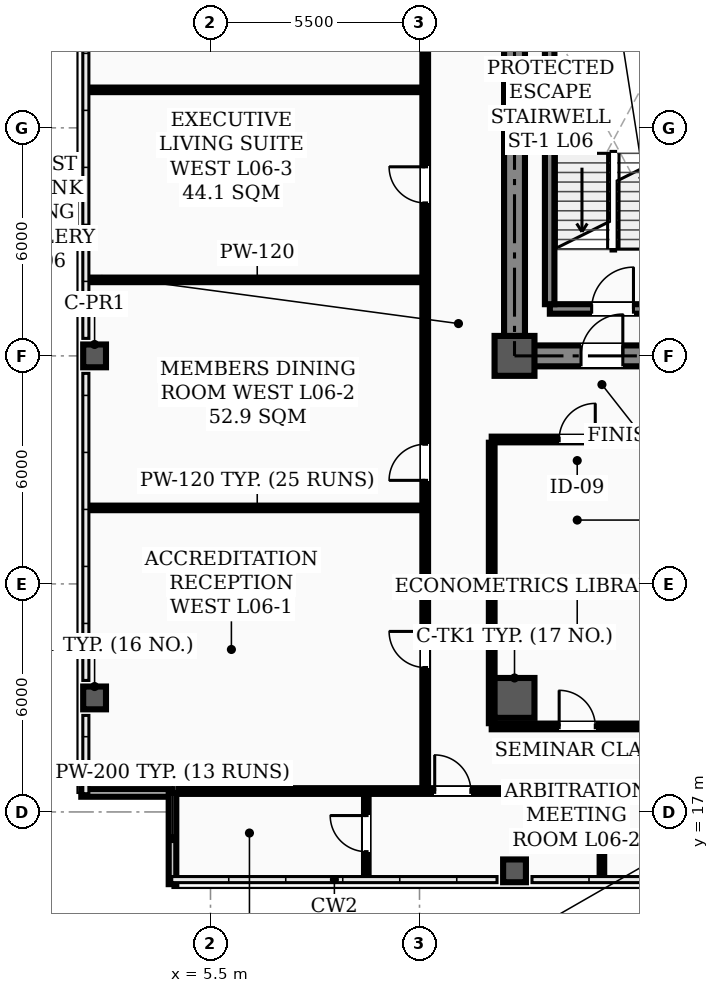
"""IFC4 building model, lengths in metres.
Left out: names, types, materials, properties, quantities, classifications, styles, units other than length and angle.
Written with IfcOpenShell. Run it as: python <this file> out.ifc"""

import sys

from ifc_helpers import new_model, si_unit, direction, frame, frame_2d, origin, origin_2d, place, context, subcontext, project, spatial, rectangle, hollow_rectangle, extrude, element, fill, save


model = new_model("IFC4")
c1 = context("Model", 3, precision=1e-05, world=origin(), true_north=direction((0.0, 1.0)))
c2 = subcontext(c1, "Body", "Model", "MODEL_VIEW")
j1 = project(units=[si_unit("LENGTHUNIT", "METRE"), si_unit("PLANEANGLEUNIT", "RADIAN")], contexts=[c1])
p1 = place(None, origin())
s1 = spatial("IfcSite", under=j1, at=p1, CompositionType="ELEMENT")
p2 = place(p1, origin())
s2 = spatial("IfcBuilding", under=s1, at=p2, CompositionType="ELEMENT")
p3 = place(p2, frame((0.0, 0.0, 26.5)))
s3 = spatial("IfcBuildingStorey", under=s2, at=p3, CompositionType="ELEMENT", Elevation=26.5)
for number, where, z_axis, x_axis in (
    (1, (13.5, 29.0, 0.0), (0.0, 0.0, 1.0), (1.0, 0.0, 0.0)),
    (2, (13.5, 20.0, 0.0), (0.0, 0.0, 1.0), (1.0, 0.0, 0.0)),
):
    element("IfcColumn", number, at=place(p3, frame(where, z_axis=z_axis, x_axis=x_axis)), inside=s3, PredefinedType="COLUMN", context=c2, shape_type="SweptSolid", body=[
        extrude(hollow_rectangle(XDim=1.05, YDim=1.05, WallThickness=0.038, InnerFilletRadius=0.019, OuterFilletRadius=0.057, at=origin_2d()), origin(), (0.0, 0.0, 1.0), 3.9),
    ])
for number, where, z_axis, x_axis in (
    (3, (2.45, 20.0, 0.0), (0.0, 0.0, 1.0), (1.0, 0.0, 0.0)),
    (4, (2.45, 29.0, 0.0), (0.0, 0.0, 1.0), (1.0, 0.0, 0.0)),
    (5, (13.5, 15.45, 0.0), (0.0, 0.0, 1.0), (1.0, 0.0, 0.0)),
):
    element("IfcColumn", number, at=place(p3, frame(where, z_axis=z_axis, x_axis=x_axis)), inside=s3, PredefinedType="COLUMN", context=c2, shape_type="SweptSolid", body=[
        extrude(hollow_rectangle(XDim=0.6, YDim=0.6, WallThickness=0.026, InnerFilletRadius=0.013, OuterFilletRadius=0.039, at=origin_2d()), origin(), (0.0, 0.0, 1.0), 3.9),
    ])
for number, where, z_axis, x_axis in (
    (6, (2.1, 17.5, 0.0), (0.0, 0.0, 1.0), (1.0, 0.0, 0.0)),
    (7, (4.5, 17.5, 0.0), (0.0, 0.0, 1.0), (0.0, -1.0, 0.0)),
):
    element("IfcWall", number, at=place(p3, frame(where, z_axis=z_axis, x_axis=x_axis)), inside=s3, PredefinedType="PARAPET", context=c2, shape_type="SweptSolid", body=[
        extrude(rectangle(XDim=2.4, YDim=0.2, at=frame_2d((1.2, 0.0))), origin(), (0.0, 0.0, 1.0), 1.2),
    ])
p4 = place(p3, frame((13.5, 29.0, 0.0), z_axis=(0.0, 0.0, 1.0), x_axis=(1.0, 0.0, 0.0)))
e8 = element("IfcWall", 8, at=p4, inside=s3, PredefinedType="SHEAR", context=c2, shape_type="SweptSolid", body=[
    extrude(rectangle(XDim=30.5, YDim=0.55, at=frame_2d((15.25, 0.0))), origin(), (0.0, 0.0, 1.0), 3.72),
])
p5 = place(p4, frame((1.75, 0.0, 0.0)))
e9 = element("IfcOpeningElement", 9, at=p5, cuts=e8, PredefinedType="OPENING", context=c2, shape_type="SweptSolid", body=[
    extrude(rectangle(XDim=1.1, YDim=2.08, at=frame_2d((0.55, 1.04))), frame((0.0, 0.285, 0.0), z_axis=(0.0, -1.0, 0.0), x_axis=(1.0, 0.0, 0.0)), (0.0, 0.0, 1.0), 0.57),
])
p6 = place(p4, frame((26.7, 0.0, 0.0)))
e10 = element("IfcOpeningElement", 10, at=p6, cuts=e8, PredefinedType="OPENING", context=c2, shape_type="SweptSolid", body=[
    extrude(rectangle(XDim=1.1, YDim=2.08, at=frame_2d((0.55, 1.04))), frame((0.0, 0.285, 0.0), z_axis=(0.0, -1.0, 0.0), x_axis=(1.0, 0.0, 0.0)), (0.0, 0.0, 1.0), 0.57),
])
p7 = place(p4, frame((6.8, 0.0, 0.0)))
e11 = element("IfcOpeningElement", 11, at=p7, cuts=e8, PredefinedType="OPENING", context=c2, shape_type="SweptSolid", body=[
    extrude(rectangle(XDim=1.1, YDim=2.08, at=frame_2d((0.55, 1.04))), frame((0.0, 0.285, 0.0), z_axis=(0.0, -1.0, 0.0), x_axis=(1.0, 0.0, 0.0)), (0.0, 0.0, 1.0), 0.57),
])
p8 = place(p4, frame((13.2, 0.0, 0.0)))
e12 = element("IfcOpeningElement", 12, at=p8, cuts=e8, PredefinedType="OPENING", context=c2, shape_type="SweptSolid", body=[
    extrude(rectangle(XDim=1.6, YDim=2.08, at=frame_2d((0.8, 1.04))), frame((0.0, 0.285, 0.0), z_axis=(0.0, -1.0, 0.0), x_axis=(1.0, 0.0, 0.0)), (0.0, 0.0, 1.0), 0.57),
])
p9 = place(p4, frame((20.525, 0.0, 0.0)))
e13 = element("IfcOpeningElement", 13, at=p9, cuts=e8, PredefinedType="OPENING", context=c2, shape_type="SweptSolid", body=[
    extrude(rectangle(XDim=0.95, YDim=2.08, at=frame_2d((0.475, 1.04))), frame((0.0, 0.285, 0.0), z_axis=(0.0, -1.0, 0.0), x_axis=(1.0, 0.0, 0.0)), (0.0, 0.0, 1.0), 0.57),
])
p10 = place(p3, frame((13.5, 29.35, 0.0), z_axis=(0.0, 0.0, 1.0), x_axis=(0.0, 1.0, 0.0)))
e14 = element("IfcWall", 14, at=p10, inside=s3, PredefinedType="SHEAR", context=c2, shape_type="SweptSolid", body=[
    extrude(rectangle(XDim=8.6, YDim=0.55, at=frame_2d((4.3, 0.0))), origin(), (0.0, 0.0, 1.0), 3.72),
])
p11 = place(p3, frame((14.43, 30.235, 0.0), z_axis=(0.0, 0.0, 1.0), x_axis=(1.0, 0.0, 0.0)))
e15 = element("IfcWall", 15, at=p11, inside=s3, PredefinedType="STANDARD", context=c2, shape_type="SweptSolid", body=[
    extrude(rectangle(XDim=3.34, YDim=0.25, at=frame_2d((1.67, 0.0))), origin(), (0.0, 0.0, 1.0), 3.72),
])
p12 = place(p11, frame((1.1, 0.0, 0.0)))
e16 = element("IfcOpeningElement", 16, at=p12, cuts=e15, PredefinedType="OPENING", context=c2, shape_type="SweptSolid", body=[
    extrude(rectangle(XDim=1.1, YDim=2.08, at=frame_2d((0.55, 1.04))), frame((0.0, 0.135, 0.0), z_axis=(0.0, -1.0, 0.0), x_axis=(1.0, 0.0, 0.0)), (0.0, 0.0, 1.0), 0.27),
])
p13 = place(p3, frame((14.425, 30.36, 0.0), z_axis=(0.0, 0.0, 1.0), x_axis=(0.0, 1.0, 0.0)))
e17 = element("IfcWall", 17, at=p13, inside=s3, PredefinedType="STANDARD", context=c2, shape_type="SweptSolid", body=[
    extrude(rectangle(XDim=7.184, YDim=0.25, at=frame_2d((3.592, 0.0))), origin(), (0.0, 0.0, 1.0), 3.72),
])
p14 = place(p3, frame((12.9, 26.8, 0.0), z_axis=(0.0, 0.0, 1.0), x_axis=(1.0, 0.0, 0.0)))
e18 = element("IfcWall", 18, at=p14, inside=s3, PredefinedType="PARTITIONING", context=c2, shape_type="SweptSolid", body=[
    extrude(rectangle(XDim=31.7, YDim=0.15, at=frame_2d((15.85, 0.0))), origin(), (0.0, 0.0, 1.0), 3.1),
])
p15 = place(p14, frame((13.6, 0.0, 0.0)))
e19 = element("IfcOpeningElement", 19, at=p15, cuts=e18, PredefinedType="OPENING", context=c2, shape_type="SweptSolid", body=[
    extrude(rectangle(XDim=1.6, YDim=2.08, at=frame_2d((0.8, 1.04))), frame((0.0, 0.085, 0.0), z_axis=(0.0, -1.0, 0.0), x_axis=(1.0, 0.0, 0.0)), (0.0, 0.0, 1.0), 0.17),
])
p16 = place(p14, frame((1.775, 0.0, 0.0)))
e20 = element("IfcOpeningElement", 20, at=p16, cuts=e18, PredefinedType="OPENING", context=c2, shape_type="SweptSolid", body=[
    extrude(rectangle(XDim=0.95, YDim=2.08, at=frame_2d((0.475, 1.04))), frame((0.0, 0.085, 0.0), z_axis=(0.0, -1.0, 0.0), x_axis=(1.0, 0.0, 0.0)), (0.0, 0.0, 1.0), 0.17),
])
p17 = place(p14, frame((6.225, 0.0, 0.0)))
e21 = element("IfcOpeningElement", 21, at=p17, cuts=e18, PredefinedType="OPENING", context=c2, shape_type="SweptSolid", body=[
    extrude(rectangle(XDim=0.95, YDim=2.08, at=frame_2d((0.475, 1.04))), frame((0.0, 0.085, 0.0), z_axis=(0.0, -1.0, 0.0), x_axis=(1.0, 0.0, 0.0)), (0.0, 0.0, 1.0), 0.17),
])
p18 = place(p14, frame((10.625, 0.0, 0.0)))
e22 = element("IfcOpeningElement", 22, at=p18, cuts=e18, PredefinedType="OPENING", context=c2, shape_type="SweptSolid", body=[
    extrude(rectangle(XDim=0.95, YDim=2.08, at=frame_2d((0.475, 1.04))), frame((0.0, 0.085, 0.0), z_axis=(0.0, -1.0, 0.0), x_axis=(1.0, 0.0, 0.0)), (0.0, 0.0, 1.0), 0.17),
])
p19 = place(p14, frame((16.075, 0.0, 0.0)))
e23 = element("IfcOpeningElement", 23, at=p19, cuts=e18, PredefinedType="OPENING", context=c2, shape_type="SweptSolid", body=[
    extrude(rectangle(XDim=0.95, YDim=2.08, at=frame_2d((0.475, 1.04))), frame((0.0, 0.085, 0.0), z_axis=(0.0, -1.0, 0.0), x_axis=(1.0, 0.0, 0.0)), (0.0, 0.0, 1.0), 0.17),
])
p20 = place(p14, frame((21.925, 0.0, 0.0)))
e24 = element("IfcOpeningElement", 24, at=p20, cuts=e18, PredefinedType="OPENING", context=c2, shape_type="SweptSolid", body=[
    extrude(rectangle(XDim=0.95, YDim=2.08, at=frame_2d((0.475, 1.04))), frame((0.0, 0.085, 0.0), z_axis=(0.0, -1.0, 0.0), x_axis=(1.0, 0.0, 0.0)), (0.0, 0.0, 1.0), 0.17),
])
p21 = place(p14, frame((28.625, 0.0, 0.0)))
e25 = element("IfcOpeningElement", 25, at=p21, cuts=e18, PredefinedType="OPENING", context=c2, shape_type="SweptSolid", body=[
    extrude(rectangle(XDim=0.95, YDim=2.08, at=frame_2d((0.475, 1.04))), frame((0.0, 0.085, 0.0), z_axis=(0.0, -1.0, 0.0), x_axis=(1.0, 0.0, 0.0)), (0.0, 0.0, 1.0), 0.17),
])
p22 = place(p3, frame((4.66, 17.55, 0.0), z_axis=(0.0, 0.0, 1.0), x_axis=(1.0, 0.0, 0.0)))
e26 = element("IfcWall", 26, at=p22, inside=s3, PredefinedType="PARTITIONING", context=c2, shape_type="SweptSolid", body=[
    extrude(rectangle(XDim=44.68, YDim=0.15, at=frame_2d((22.34, 0.0))), origin(), (0.0, 0.0, 1.0), 3.1),
])
p23 = place(p22, frame((6.74, 0.0, 0.0)))
e27 = element("IfcOpeningElement", 27, at=p23, cuts=e26, PredefinedType="OPENING", context=c2, shape_type="SweptSolid", body=[
    extrude(rectangle(XDim=0.95, YDim=2.08, at=frame_2d((0.475, 1.04))), frame((0.0, 0.085, 0.0), z_axis=(0.0, -1.0, 0.0), x_axis=(1.0, 0.0, 0.0)), (0.0, 0.0, 1.0), 0.17),
])
p24 = place(p22, frame((13.865, 0.0, 0.0)))
e28 = element("IfcOpeningElement", 28, at=p24, cuts=e26, PredefinedType="OPENING", context=c2, shape_type="SweptSolid", body=[
    extrude(rectangle(XDim=0.95, YDim=2.08, at=frame_2d((0.475, 1.04))), frame((0.0, 0.085, 0.0), z_axis=(0.0, -1.0, 0.0), x_axis=(1.0, 0.0, 0.0)), (0.0, 0.0, 1.0), 0.17),
])
p25 = place(p22, frame((28.765, 0.0, 0.0)))
e29 = element("IfcOpeningElement", 29, at=p25, cuts=e26, PredefinedType="OPENING", context=c2, shape_type="SweptSolid", body=[
    extrude(rectangle(XDim=0.95, YDim=2.08, at=frame_2d((0.475, 1.04))), frame((0.0, 0.085, 0.0), z_axis=(0.0, -1.0, 0.0), x_axis=(1.0, 0.0, 0.0)), (0.0, 0.0, 1.0), 0.17),
])
p26 = place(p22, frame((34.465, 0.0, 0.0)))
e30 = element("IfcOpeningElement", 30, at=p26, cuts=e26, PredefinedType="OPENING", context=c2, shape_type="SweptSolid", body=[
    extrude(rectangle(XDim=0.95, YDim=2.08, at=frame_2d((0.475, 1.04))), frame((0.0, 0.085, 0.0), z_axis=(0.0, -1.0, 0.0), x_axis=(1.0, 0.0, 0.0)), (0.0, 0.0, 1.0), 0.17),
])
p27 = place(p22, frame((39.24, 0.0, 0.0)))
e31 = element("IfcOpeningElement", 31, at=p27, cuts=e26, PredefinedType="OPENING", context=c2, shape_type="SweptSolid", body=[
    extrude(rectangle(XDim=0.95, YDim=2.08, at=frame_2d((0.475, 1.04))), frame((0.0, 0.085, 0.0), z_axis=(0.0, -1.0, 0.0), x_axis=(1.0, 0.0, 0.0)), (0.0, 0.0, 1.0), 0.17),
])
p28 = place(p3, frame((12.9, 19.25, 0.0), z_axis=(0.0, 0.0, 1.0), x_axis=(1.0, 0.0, 0.0)))
e32 = element("IfcWall", 32, at=p28, inside=s3, PredefinedType="PARTITIONING", context=c2, shape_type="SweptSolid", body=[
    extrude(rectangle(XDim=13.3, YDim=0.15, at=frame_2d((6.65, 0.0))), origin(), (0.0, 0.0, 1.0), 3.1),
])
p29 = place(p28, frame((1.775, 0.0, 0.0)))
e33 = element("IfcOpeningElement", 33, at=p29, cuts=e32, PredefinedType="OPENING", context=c2, shape_type="SweptSolid", body=[
    extrude(rectangle(XDim=0.95, YDim=2.08, at=frame_2d((0.475, 1.04))), frame((0.0, 0.085, 0.0), z_axis=(0.0, -1.0, 0.0), x_axis=(1.0, 0.0, 0.0)), (0.0, 0.0, 1.0), 0.17),
])
p30 = place(p28, frame((6.225, 0.0, 0.0)))
e34 = element("IfcOpeningElement", 34, at=p30, cuts=e32, PredefinedType="OPENING", context=c2, shape_type="SweptSolid", body=[
    extrude(rectangle(XDim=0.95, YDim=2.08, at=frame_2d((0.475, 1.04))), frame((0.0, 0.085, 0.0), z_axis=(0.0, -1.0, 0.0), x_axis=(1.0, 0.0, 0.0)), (0.0, 0.0, 1.0), 0.17),
])
p31 = place(p28, frame((12.175, 0.0, 0.0)))
e35 = element("IfcOpeningElement", 35, at=p31, cuts=e32, PredefinedType="OPENING", context=c2, shape_type="SweptSolid", body=[
    extrude(rectangle(XDim=0.95, YDim=2.08, at=frame_2d((0.475, 1.04))), frame((0.0, 0.085, 0.0), z_axis=(0.0, -1.0, 0.0), x_axis=(1.0, 0.0, 0.0)), (0.0, 0.0, 1.0), 0.17),
])
p32 = place(p3, frame((12.9, 23.0, 0.0), z_axis=(0.0, 0.0, 1.0), x_axis=(1.0, 0.0, 0.0)))
e36 = element("IfcWall", 36, at=p32, inside=s3, PredefinedType="PARTITIONING", context=c2, shape_type="SweptSolid", body=[
    extrude(rectangle(XDim=4.5, YDim=0.12, at=frame_2d((2.25, 0.0))), origin(), (0.0, 0.0, 1.0), 3.1),
])
for number, where, z_axis, x_axis in (
    (37, (2.31, 25.0, 0.0), (0.0, 0.0, 1.0), (1.0, 0.0, 0.0)),
    (38, (2.31, 31.0, 0.0), (0.0, 0.0, 1.0), (1.0, 0.0, 0.0)),
    (39, (2.31, 36.0, 0.0), (0.0, 0.0, 1.0), (1.0, 0.0, 0.0)),
):
    element("IfcWall", number, at=place(p3, frame(where, z_axis=z_axis, x_axis=x_axis)), inside=s3, PredefinedType="PARTITIONING", context=c2, shape_type="SweptSolid", body=[
        extrude(rectangle(XDim=8.84, YDim=0.12, at=frame_2d((4.42, 0.0))), origin(), (0.0, 0.0, 1.0), 3.212),
    ])
p33 = place(p3, frame((11.15, 17.635, 0.0), z_axis=(0.0, 0.0, 1.0), x_axis=(0.0, 1.0, 0.0)))
e40 = element("IfcWall", 40, at=p33, inside=s3, PredefinedType="PARTITIONING", context=c2, shape_type="SweptSolid", body=[
    extrude(rectangle(XDim=22.53, YDim=0.15, at=frame_2d((11.265, 0.0))), origin(), (0.0, 0.0, 1.0), 3.0),
])
p34 = place(p33, frame((3.165, 0.0, 0.0)))
e41 = element("IfcOpeningElement", 41, at=p34, cuts=e40, PredefinedType="OPENING", context=c2, shape_type="SweptSolid", body=[
    extrude(rectangle(XDim=0.95, YDim=2.08, at=frame_2d((0.475, 1.04))), frame((0.0, 0.085, 0.0), z_axis=(0.0, -1.0, 0.0), x_axis=(1.0, 0.0, 0.0)), (0.0, 0.0, 1.0), 0.17),
])
p35 = place(p33, frame((8.09, 0.0, 0.0)))
e42 = element("IfcOpeningElement", 42, at=p35, cuts=e40, PredefinedType="OPENING", context=c2, shape_type="SweptSolid", body=[
    extrude(rectangle(XDim=0.95, YDim=2.08, at=frame_2d((0.475, 1.04))), frame((0.0, 0.085, 0.0), z_axis=(0.0, -1.0, 0.0), x_axis=(1.0, 0.0, 0.0)), (0.0, 0.0, 1.0), 0.17),
])
p36 = place(p33, frame((15.39, 0.0, 0.0)))
e43 = element("IfcOpeningElement", 43, at=p36, cuts=e40, PredefinedType="OPENING", context=c2, shape_type="SweptSolid", body=[
    extrude(rectangle(XDim=0.95, YDim=2.08, at=frame_2d((0.475, 1.04))), frame((0.0, 0.085, 0.0), z_axis=(0.0, -1.0, 0.0), x_axis=(1.0, 0.0, 0.0)), (0.0, 0.0, 1.0), 0.17),
])
p37 = place(p33, frame((20.015, 0.0, 0.0)))
e44 = element("IfcOpeningElement", 44, at=p37, cuts=e40, PredefinedType="OPENING", context=c2, shape_type="SweptSolid", body=[
    extrude(rectangle(XDim=0.95, YDim=2.08, at=frame_2d((0.475, 1.04))), frame((0.0, 0.085, 0.0), z_axis=(0.0, -1.0, 0.0), x_axis=(1.0, 0.0, 0.0)), (0.0, 0.0, 1.0), 0.17),
])
p38 = place(p3, frame((12.9, 19.335, 0.0), z_axis=(0.0, 0.0, 1.0), x_axis=(0.0, 1.0, 0.0)))
e45 = element("IfcWall", 45, at=p38, inside=s3, PredefinedType="PARTITIONING", context=c2, shape_type="SweptSolid", body=[
    extrude(rectangle(XDim=7.38, YDim=0.15, at=frame_2d((3.69, 0.0))), origin(), (0.0, 0.0, 1.0), 3.0),
])
p39 = place(p3, frame((9.6, 15.31, 0.0), z_axis=(0.0, 0.0, 1.0), x_axis=(0.0, 1.0, 0.0)))
e46 = element("IfcWall", 46, at=p39, inside=s3, PredefinedType="PARTITIONING", context=c2, shape_type="SweptSolid", body=[
    extrude(rectangle(XDim=2.155, YDim=0.12, at=frame_2d((1.078, 0.0))), origin(), (0.0, 0.0, 1.0), 3.72),
])
p40 = place(p39, frame((0.645, 0.0, 0.0)))
e47 = element("IfcOpeningElement", 47, at=p40, cuts=e46, PredefinedType="OPENING", context=c2, shape_type="SweptSolid", body=[
    extrude(rectangle(XDim=0.95, YDim=2.08, at=frame_2d((0.475, 1.04))), frame((0.0, 0.07, 0.0), z_axis=(0.0, -1.0, 0.0), x_axis=(1.0, 0.0, 0.0)), (0.0, 0.0, 1.0), 0.14),
])
p41 = place(p3, frame((15.8, 15.31, 0.0), z_axis=(0.0, 0.0, 1.0), x_axis=(0.0, 1.0, 0.0)))
e48 = element("IfcWall", 48, at=p41, inside=s3, PredefinedType="PARTITIONING", context=c2, shape_type="SweptSolid", body=[
    extrude(rectangle(XDim=2.155, YDim=0.12, at=frame_2d((1.078, 0.0))), origin(), (0.0, 0.0, 1.0), 3.212),
])
p42 = place(p12, origin())
e49 = element("IfcDoor", 49, at=p42, inside=s3, OperationType="SINGLE_SWING_RIGHT", PredefinedType="DOOR", context=c2, shape_type="SweptSolid", body=[
    extrude(rectangle(XDim=1.1, YDim=2.08, at=frame_2d((0.55, 1.04))), frame((0.0, 0.025, 0.0), z_axis=(0.0, -1.0, 0.0), x_axis=(1.0, 0.0, 0.0)), (0.0, 0.0, 1.0), 0.05),
])
fill(e16, e49)
p43 = place(p5, origin())
e50 = element("IfcDoor", 50, at=p43, inside=s3, OperationType="SINGLE_SWING_RIGHT", PredefinedType="DOOR", context=c2, shape_type="SweptSolid", body=[
    extrude(rectangle(XDim=1.1, YDim=2.08, at=frame_2d((0.55, 1.04))), frame((0.0, 0.025, 0.0), z_axis=(0.0, -1.0, 0.0), x_axis=(1.0, 0.0, 0.0)), (0.0, 0.0, 1.0), 0.05),
])
fill(e9, e50)
p44 = place(p40, origin())
e51 = element("IfcDoor", 51, at=p44, inside=s3, OperationType="SINGLE_SWING_RIGHT", PredefinedType="DOOR", context=c2, shape_type="SweptSolid", body=[
    extrude(rectangle(XDim=0.95, YDim=2.08, at=frame_2d((0.475, 1.04))), frame((0.0, 0.025, 0.0), z_axis=(0.0, -1.0, 0.0), x_axis=(1.0, 0.0, 0.0)), (0.0, 0.0, 1.0), 0.05),
])
fill(e47, e51)
p45 = place(p23, origin())
e52 = element("IfcDoor", 52, at=p45, inside=s3, OperationType="SINGLE_SWING_LEFT", PredefinedType="DOOR", context=c2, shape_type="SweptSolid", body=[
    extrude(rectangle(XDim=0.95, YDim=2.08, at=frame_2d((0.475, 1.04))), frame((0.0, 0.025, 0.0), z_axis=(0.0, -1.0, 0.0), x_axis=(1.0, 0.0, 0.0)), (0.0, 0.0, 1.0), 0.05),
])
fill(e27, e52)
p46 = place(p16, origin())
e53 = element("IfcDoor", 53, at=p46, inside=s3, OperationType="SINGLE_SWING_RIGHT", PredefinedType="DOOR", context=c2, shape_type="SweptSolid", body=[
    extrude(rectangle(XDim=0.95, YDim=2.08, at=frame_2d((0.475, 1.04))), frame((0.0, 0.025, 0.0), z_axis=(0.0, -1.0, 0.0), x_axis=(1.0, 0.0, 0.0)), (0.0, 0.0, 1.0), 0.05),
])
fill(e20, e53)
p47 = place(p29, origin())
e54 = element("IfcDoor", 54, at=p47, inside=s3, OperationType="SINGLE_SWING_LEFT", PredefinedType="DOOR", context=c2, shape_type="SweptSolid", body=[
    extrude(rectangle(XDim=0.95, YDim=2.08, at=frame_2d((0.475, 1.04))), frame((0.0, 0.025, 0.0), z_axis=(0.0, -1.0, 0.0), x_axis=(1.0, 0.0, 0.0)), (0.0, 0.0, 1.0), 0.05),
])
fill(e33, e54)
p48 = place(p34, origin())
e55 = element("IfcDoor", 55, at=p48, inside=s3, OperationType="SINGLE_SWING_RIGHT", PredefinedType="DOOR", context=c2, shape_type="SweptSolid", body=[
    extrude(rectangle(XDim=0.95, YDim=2.08, at=frame_2d((0.475, 1.04))), frame((0.0, 0.025, 0.0), z_axis=(0.0, -1.0, 0.0), x_axis=(1.0, 0.0, 0.0)), (0.0, 0.0, 1.0), 0.05),
])
fill(e41, e55)
p49 = place(p35, origin())
e56 = element("IfcDoor", 56, at=p49, inside=s3, OperationType="SINGLE_SWING_LEFT", PredefinedType="DOOR", context=c2, shape_type="SweptSolid", body=[
    extrude(rectangle(XDim=0.95, YDim=2.08, at=frame_2d((0.475, 1.04))), frame((0.0, 0.025, 0.0), z_axis=(0.0, -1.0, 0.0), x_axis=(1.0, 0.0, 0.0)), (0.0, 0.0, 1.0), 0.05),
])
fill(e42, e56)
p50 = place(p36, origin())
e57 = element("IfcDoor", 57, at=p50, inside=s3, OperationType="SINGLE_SWING_RIGHT", PredefinedType="DOOR", context=c2, shape_type="SweptSolid", body=[
    extrude(rectangle(XDim=0.95, YDim=2.08, at=frame_2d((0.475, 1.04))), frame((0.0, 0.025, 0.0), z_axis=(0.0, -1.0, 0.0), x_axis=(1.0, 0.0, 0.0)), (0.0, 0.0, 1.0), 0.05),
])
fill(e43, e57)
save(model, sys.argv[1])
